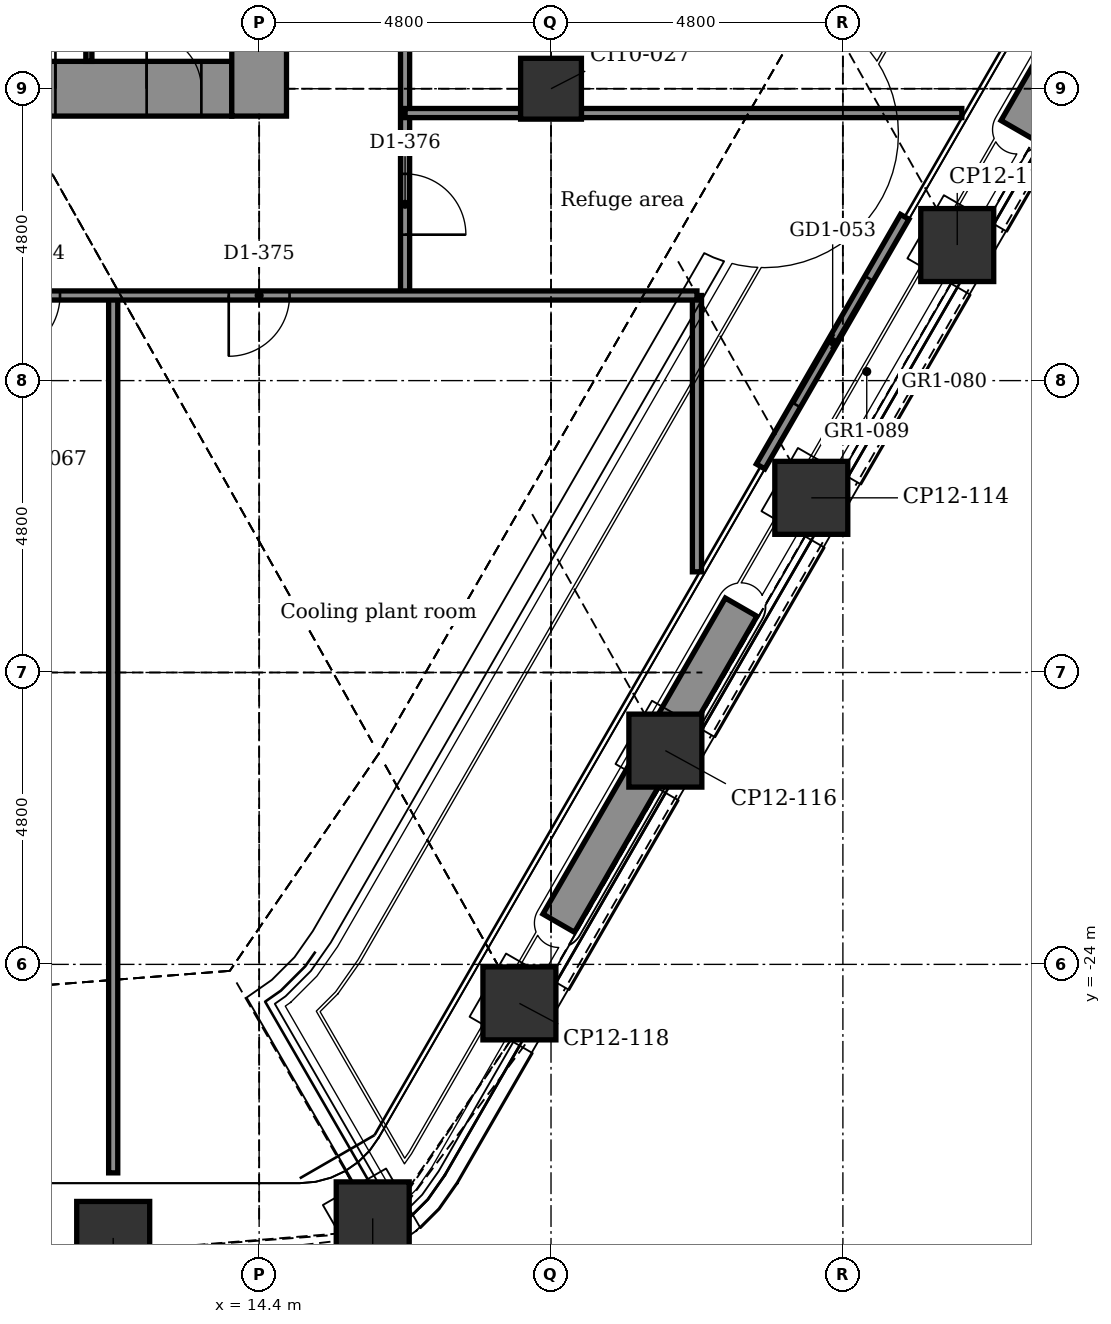
"""IFC4 building model, lengths in metres.
Left out: names, types, materials, properties, quantities, classifications, styles, units other than length and angle.
Written with IfcOpenShell. Run it as: python <this file> out.ifc"""

import sys

from ifc_helpers import new_model, si_unit, direction, frame, frame_2d, origin, origin_2d, place, context, subcontext, project, spatial, rectangle, extrude, element, fill, save


model = new_model("IFC4")
c1 = context("Model", 3, precision=1e-05, world=origin(), true_north=direction((0.0, 1.0)))
c2 = subcontext(c1, "Body", "Model", "MODEL_VIEW")
j1 = project(units=[si_unit("LENGTHUNIT", "METRE"), si_unit("PLANEANGLEUNIT", "RADIAN")], contexts=[c1])
p1 = place(None, origin())
s1 = spatial("IfcSite", under=j1, at=p1, CompositionType="ELEMENT")
p2 = place(p1, origin())
s2 = spatial("IfcBuilding", under=s1, at=p2, CompositionType="ELEMENT")
p3 = place(p2, frame((0.0, 0.0, 127.4)))
s3 = spatial("IfcBuildingStorey", under=s2, at=p3, CompositionType="ELEMENT", Elevation=127.4)
for number, where, z_axis, x_axis in (
    (1, (25.88, -12.171, -0.3), (0.0, 0.0, 1.0), (0.5, 0.866, 0.0)),
    (2, (23.48, -16.328, -0.3), (0.0, 0.0, 1.0), (0.5, 0.866, 0.0)),
    (3, (21.08, -20.485, -0.3), (0.0, 0.0, 1.0), (0.5, 0.866, 0.0)),
    (4, (18.68, -24.642, -0.3), (0.0, 0.0, 1.0), (0.5, 0.866, 0.0)),
    (5, (16.268, -28.177, -0.3), (0.0, 0.0, 1.0), (0.866, 0.5, 0.0)),
    (6, (12.0, -28.499, -0.3), (0.0, 0.0, 1.0), (1.0, 0.0, 0.0)),
):
    element("IfcColumn", number, at=place(p3, frame(where, z_axis=z_axis, x_axis=x_axis)), inside=s3, PredefinedType="COLUMN", context=c2, shape_type="SweptSolid", body=[
        extrude(rectangle(XDim=1.2, YDim=1.2, at=origin_2d()), origin(), (0.0, 0.0, 1.0), 6.15),
    ])
p4 = place(p3, frame((19.2, -9.6, -0.3), z_axis=(0.0, 0.0, 1.0), x_axis=(1.0, 0.0, 0.0)))
e7 = element("IfcColumn", 7, at=p4, inside=s3, PredefinedType="COLUMN", context=c2, shape_type="SweptSolid", body=[
    extrude(rectangle(XDim=1.0, YDim=1.0, at=origin_2d()), origin(), (0.0, 0.0, 1.0), 6.15),
])
p5 = place(p3, frame((10.05, -9.6, -0.3), z_axis=(0.0, 0.0, 1.0), x_axis=(1.0, 0.0, 0.0)))
e8 = element("IfcWall", 8, at=p5, inside=s3, PredefinedType="SHEAR", context=c2, shape_type="SweptSolid", body=[
    extrude(rectangle(XDim=3.9, YDim=0.9, at=frame_2d((1.95, 0.0))), origin(), (0.0, 0.0, 1.0), 6.15),
])
p6 = place(p5, frame((0.1, 0.0, 0.3)))
e9 = element("IfcOpeningElement", 9, at=p6, cuts=e8, PredefinedType="OPENING", context=c2, shape_type="SweptSolid", body=[
    extrude(rectangle(XDim=0.9, YDim=2.1, at=frame_2d((0.45, 1.05))), frame((0.0, 0.46, 0.0), z_axis=(0.0, -1.0, 0.0), x_axis=(1.0, 0.0, 0.0)), (0.0, 0.0, 1.0), 0.92),
])
p7 = place(p5, frame((2.5, 0.0, 0.3)))
e10 = element("IfcOpeningElement", 10, at=p7, cuts=e8, PredefinedType="OPENING", context=c2, shape_type="SweptSolid", body=[
    extrude(rectangle(XDim=0.9, YDim=2.1, at=frame_2d((0.45, 1.05))), frame((0.0, 0.46, 0.0), z_axis=(0.0, -1.0, 0.0), x_axis=(1.0, 0.0, 0.0)), (0.0, 0.0, 1.0), 0.92),
])
p8 = place(p3, frame((14.4, -10.05, -0.3), z_axis=(0.0, 0.0, 1.0), x_axis=(0.0, 1.0, 0.0)))
e11 = element("IfcWall", 11, at=p8, inside=s3, PredefinedType="SHEAR", context=c2, shape_type="SweptSolid", body=[
    extrude(rectangle(XDim=20.1, YDim=0.9, at=frame_2d((10.05, 0.0))), origin(), (0.0, 0.0, 1.0), 6.15),
])
p9 = place(p8, frame((3.5, 0.0, 0.3)))
e12 = element("IfcOpeningElement", 12, at=p9, cuts=e11, PredefinedType="OPENING", context=c2, shape_type="SweptSolid", body=[
    extrude(rectangle(XDim=1.1, YDim=2.1, at=frame_2d((0.55, 1.05))), frame((0.0, 0.46, 0.0), z_axis=(0.0, -1.0, 0.0), x_axis=(1.0, 0.0, 0.0)), (0.0, 0.0, 1.0), 0.92),
])
p10 = place(p8, frame((5.9, 0.0, 0.3)))
e13 = element("IfcOpeningElement", 13, at=p10, cuts=e11, PredefinedType="OPENING", context=c2, shape_type="SweptSolid", body=[
    extrude(rectangle(XDim=1.1, YDim=2.1, at=frame_2d((0.55, 1.05))), frame((0.0, 0.46, 0.0), z_axis=(0.0, -1.0, 0.0), x_axis=(1.0, 0.0, 0.0)), (0.0, 0.0, 1.0), 0.92),
])
p11 = place(p8, frame((8.3, 0.0, 0.3)))
e14 = element("IfcOpeningElement", 14, at=p11, cuts=e11, PredefinedType="OPENING", context=c2, shape_type="SweptSolid", body=[
    extrude(rectangle(XDim=1.1, YDim=2.1, at=frame_2d((0.55, 1.05))), frame((0.0, 0.46, 0.0), z_axis=(0.0, -1.0, 0.0), x_axis=(1.0, 0.0, 0.0)), (0.0, 0.0, 1.0), 0.92),
])
p12 = place(p8, frame((10.7, 0.0, 0.3)))
e15 = element("IfcOpeningElement", 15, at=p12, cuts=e11, PredefinedType="OPENING", context=c2, shape_type="SweptSolid", body=[
    extrude(rectangle(XDim=1.1, YDim=2.1, at=frame_2d((0.55, 1.05))), frame((0.0, 0.46, 0.0), z_axis=(0.0, -1.0, 0.0), x_axis=(1.0, 0.0, 0.0)), (0.0, 0.0, 1.0), 0.92),
])
p13 = place(p3, frame((25.017, -11.707, 0.0), z_axis=(0.0, 0.0, 1.0), x_axis=(-0.499978080042, -0.866038058908, 0.0)))
e16 = element("IfcWall", 16, at=p13, inside=s3, PredefinedType="PARTITIONING", context=c2, shape_type="SweptSolid", body=[
    extrude(rectangle(XDim=4.74, YDim=0.16, at=frame_2d((2.37, 0.0))), origin(), (0.0, 0.0, 1.0), 5.7),
])
p14 = place(p13, frame((1.17, 0.0, 0.0)))
e17 = element("IfcOpeningElement", 17, at=p14, cuts=e16, PredefinedType="OPENING", context=c2, shape_type="SweptSolid", body=[
    extrude(rectangle(XDim=2.4, YDim=2.4, at=frame_2d((1.2, 1.2))), frame((0.0, 0.09, 0.0), z_axis=(0.0, -1.0, 0.0), x_axis=(1.0, 0.0, 0.0)), (0.0, 0.0, 1.0), 0.18),
])
for number, where, z_axis, x_axis in (
    (18, (29.861, -5.076, 6.0), (0.0, 0.0, 1.0), (-0.5, -0.866, 0.0)),
    (19, (22.327, -18.126, 6.0), (0.0, 0.0, 1.0), (-0.5, -0.866, 0.0)),
):
    element("IfcWall", number, at=place(p3, frame(where, z_axis=z_axis, x_axis=x_axis)), inside=s3, PredefinedType="USERDEFINED", context=c2, shape_type="SweptSolid", body=[
        extrude(rectangle(XDim=6.0, YDim=0.6, at=frame_2d((3.0, 0.0))), origin(), (0.0, 0.0, 1.0), 0.7),
    ])
p15 = place(p3, frame((21.6, -17.545, 0.0), z_axis=(0.0, 0.0, 1.0), x_axis=(0.0, 1.0, 0.0)))
e20 = element("IfcWall", 20, at=p15, inside=s3, PredefinedType="PARTITIONING", context=c2, shape_type="SweptSolid", body=[
    extrude(rectangle(XDim=4.545, YDim=0.15, at=frame_2d((2.272, 0.0))), origin(), (0.0, 0.0, 1.0), 5.7),
])
p16 = place(p3, frame((16.8, -13.0, 0.0), z_axis=(0.0, 0.0, 1.0), x_axis=(0.0, 1.0, 0.0)))
e21 = element("IfcWall", 21, at=p16, inside=s3, PredefinedType="PARTITIONING", context=c2, shape_type="SweptSolid", body=[
    extrude(rectangle(XDim=9.05, YDim=0.15, at=frame_2d((4.525, 0.0))), origin(), (0.0, 0.0, 1.0), 5.85),
])
p17 = place(p16, frame((1.0, 0.0, 0.0)))
e22 = element("IfcOpeningElement", 22, at=p17, cuts=e21, PredefinedType="OPENING", context=c2, shape_type="SweptSolid", body=[
    extrude(rectangle(XDim=1.0, YDim=2.1, at=frame_2d((0.5, 1.05))), frame((0.0, 0.085, 0.0), z_axis=(0.0, -1.0, 0.0), x_axis=(1.0, 0.0, 0.0)), (0.0, 0.0, 1.0), 0.17),
])
p18 = place(p16, frame((5.8, 0.0, 0.0)))
e23 = element("IfcOpeningElement", 23, at=p18, cuts=e21, PredefinedType="OPENING", context=c2, shape_type="SweptSolid", body=[
    extrude(rectangle(XDim=1.0, YDim=2.1, at=frame_2d((0.5, 1.05))), frame((0.0, 0.085, 0.0), z_axis=(0.0, -1.0, 0.0), x_axis=(1.0, 0.0, 0.0)), (0.0, 0.0, 1.0), 0.17),
])
p19 = place(p3, frame((12.0, -27.428, 0.0), z_axis=(0.0, 0.0, 1.0), x_axis=(0.0, 1.0, 0.0)))
e24 = element("IfcWall", 24, at=p19, inside=s3, PredefinedType="PARTITIONING", context=c2, shape_type="SweptSolid", body=[
    extrude(rectangle(XDim=14.428, YDim=0.15, at=frame_2d((7.214, 0.0))), origin(), (0.0, 0.0, 1.0), 5.85),
])
p20 = place(p3, frame((11.6, -9.15, 0.0), z_axis=(0.0, 0.0, 1.0), x_axis=(0.0, 1.0, 0.0)))
e25 = element("IfcWall", 25, at=p20, inside=s3, PredefinedType="PARTITIONING", context=c2, shape_type="SweptSolid", body=[
    extrude(rectangle(XDim=1.8, YDim=0.1, at=frame_2d((0.9, 0.0))), origin(), (0.0, 0.0, 1.0), 5.85),
])
p21 = place(p3, frame((-21.6, -13.0, 0.0), z_axis=(0.0, 0.0, 1.0), x_axis=(1.0, 0.0, 0.0)))
e26 = element("IfcWall", 26, at=p21, inside=s3, PredefinedType="PARTITIONING", context=c2, shape_type="SweptSolid", body=[
    extrude(rectangle(XDim=43.2, YDim=0.15, at=frame_2d((21.6, 0.0))), origin(), (0.0, 0.0, 1.0), 5.7),
])
p22 = place(p21, frame((5.5, 0.0, 0.0)))
e27 = element("IfcOpeningElement", 27, at=p22, cuts=e26, PredefinedType="OPENING", context=c2, shape_type="SweptSolid", body=[
    extrude(rectangle(XDim=1.0, YDim=2.1, at=frame_2d((0.5, 1.05))), frame((0.0, 0.085, 0.0), z_axis=(0.0, -1.0, 0.0), x_axis=(1.0, 0.0, 0.0)), (0.0, 0.0, 1.0), 0.17),
])
p23 = place(p21, frame((10.425, 0.0, 0.0)))
e28 = element("IfcOpeningElement", 28, at=p23, cuts=e26, PredefinedType="OPENING", context=c2, shape_type="SweptSolid", body=[
    extrude(rectangle(XDim=1.0, YDim=2.1, at=frame_2d((0.5, 1.05))), frame((0.0, 0.085, 0.0), z_axis=(0.0, -1.0, 0.0), x_axis=(1.0, 0.0, 0.0)), (0.0, 0.0, 1.0), 0.17),
])
p24 = place(p21, frame((16.955, 0.0, 0.0)))
e29 = element("IfcOpeningElement", 29, at=p24, cuts=e26, PredefinedType="OPENING", context=c2, shape_type="SweptSolid", body=[
    extrude(rectangle(XDim=1.0, YDim=2.1, at=frame_2d((0.5, 1.05))), frame((0.0, 0.085, 0.0), z_axis=(0.0, -1.0, 0.0), x_axis=(1.0, 0.0, 0.0)), (0.0, 0.0, 1.0), 0.17),
])
p25 = place(p21, frame((19.9, 0.0, 0.0)))
e30 = element("IfcOpeningElement", 30, at=p25, cuts=e26, PredefinedType="OPENING", context=c2, shape_type="SweptSolid", body=[
    extrude(rectangle(XDim=1.0, YDim=2.1, at=frame_2d((0.5, 1.05))), frame((0.0, 0.085, 0.0), z_axis=(0.0, -1.0, 0.0), x_axis=(1.0, 0.0, 0.0)), (0.0, 0.0, 1.0), 0.17),
])
p26 = place(p21, frame((22.3, 0.0, 0.0)))
e31 = element("IfcOpeningElement", 31, at=p26, cuts=e26, PredefinedType="OPENING", context=c2, shape_type="SweptSolid", body=[
    extrude(rectangle(XDim=1.0, YDim=2.1, at=frame_2d((0.5, 1.05))), frame((0.0, 0.085, 0.0), z_axis=(0.0, -1.0, 0.0), x_axis=(1.0, 0.0, 0.0)), (0.0, 0.0, 1.0), 0.17),
])
p27 = place(p21, frame((24.7, 0.0, 0.0)))
e32 = element("IfcOpeningElement", 32, at=p27, cuts=e26, PredefinedType="OPENING", context=c2, shape_type="SweptSolid", body=[
    extrude(rectangle(XDim=1.0, YDim=2.1, at=frame_2d((0.5, 1.05))), frame((0.0, 0.085, 0.0), z_axis=(0.0, -1.0, 0.0), x_axis=(1.0, 0.0, 0.0)), (0.0, 0.0, 1.0), 0.17),
])
p28 = place(p21, frame((28.3, 0.0, 0.0)))
e33 = element("IfcOpeningElement", 33, at=p28, cuts=e26, PredefinedType="OPENING", context=c2, shape_type="SweptSolid", body=[
    extrude(rectangle(XDim=1.0, YDim=2.1, at=frame_2d((0.5, 1.05))), frame((0.0, 0.085, 0.0), z_axis=(0.0, -1.0, 0.0), x_axis=(1.0, 0.0, 0.0)), (0.0, 0.0, 1.0), 0.17),
])
p29 = place(p21, frame((31.725, 0.0, 0.0)))
e34 = element("IfcOpeningElement", 34, at=p29, cuts=e26, PredefinedType="OPENING", context=c2, shape_type="SweptSolid", body=[
    extrude(rectangle(XDim=1.0, YDim=2.1, at=frame_2d((0.5, 1.05))), frame((0.0, 0.085, 0.0), z_axis=(0.0, -1.0, 0.0), x_axis=(1.0, 0.0, 0.0)), (0.0, 0.0, 1.0), 0.17),
])
p30 = place(p21, frame((35.5, 0.0, 0.0)))
e35 = element("IfcOpeningElement", 35, at=p30, cuts=e26, PredefinedType="OPENING", context=c2, shape_type="SweptSolid", body=[
    extrude(rectangle(XDim=1.0, YDim=2.1, at=frame_2d((0.5, 1.05))), frame((0.0, 0.085, 0.0), z_axis=(0.0, -1.0, 0.0), x_axis=(1.0, 0.0, 0.0)), (0.0, 0.0, 1.0), 0.17),
])
p31 = place(p3, frame((16.8, -10.0, 0.0), z_axis=(0.0, 0.0, 1.0), x_axis=(1.0, 0.0, 0.0)))
e36 = element("IfcWall", 36, at=p31, inside=s3, PredefinedType="PARTITIONING", context=c2, shape_type="SweptSolid", body=[
    extrude(rectangle(XDim=1.9, YDim=0.15, at=frame_2d((0.95, 0.0))), origin(), (0.0, 0.0, 1.0), 5.85),
])
p32 = place(p3, frame((19.7, -10.0, 0.0), z_axis=(0.0, 0.0, 1.0), x_axis=(1.0, 0.0, 0.0)))
e37 = element("IfcWall", 37, at=p32, inside=s3, PredefinedType="PARTITIONING", context=c2, shape_type="SweptSolid", body=[
    extrude(rectangle(XDim=6.256, YDim=0.15, at=frame_2d((3.128, 0.0))), origin(), (0.0, 0.0, 1.0), 5.7),
])
p33 = place(p14, origin())
e38 = element("IfcDoor", 38, at=p33, inside=s3, OperationType="DOUBLE_DOOR_SLIDING", PredefinedType="DOOR", context=c2, shape_type="SweptSolid", body=[
    extrude(rectangle(XDim=2.4, YDim=2.4, at=frame_2d((1.2, 1.2))), frame((0.0, 0.025, 0.0), z_axis=(0.0, -1.0, 0.0), x_axis=(1.0, 0.0, 0.0)), (0.0, 0.0, 1.0), 0.05),
])
fill(e17, e38)
p34 = place(p29, frame((1.0, 0.0, 0.0), z_axis=(0.0, 0.0, 1.0), x_axis=(-1.0, 0.0, 0.0)))
e39 = element("IfcDoor", 39, at=p34, inside=s3, OperationType="SINGLE_SWING_LEFT", PredefinedType="DOOR", context=c2, shape_type="SweptSolid", body=[
    extrude(rectangle(XDim=1.0, YDim=2.1, at=frame_2d((0.5, 1.05))), frame((0.0, 0.025, 0.0), z_axis=(0.0, -1.0, 0.0), x_axis=(1.0, 0.0, 0.0)), (0.0, 0.0, 1.0), 0.05),
])
fill(e34, e39)
p35 = place(p30, frame((1.0, 0.0, 0.0), z_axis=(0.0, 0.0, 1.0), x_axis=(-1.0, 0.0, 0.0)))
e40 = element("IfcDoor", 40, at=p35, inside=s3, OperationType="SINGLE_SWING_LEFT", PredefinedType="DOOR", context=c2, shape_type="SweptSolid", body=[
    extrude(rectangle(XDim=1.0, YDim=2.1, at=frame_2d((0.5, 1.05))), frame((0.0, 0.025, 0.0), z_axis=(0.0, -1.0, 0.0), x_axis=(1.0, 0.0, 0.0)), (0.0, 0.0, 1.0), 0.05),
])
fill(e35, e40)
p36 = place(p17, frame((1.0, 0.0, 0.0), z_axis=(0.0, 0.0, 1.0), x_axis=(-1.0, 0.0, 0.0)))
e41 = element("IfcDoor", 41, at=p36, inside=s3, OperationType="SINGLE_SWING_LEFT", PredefinedType="DOOR", context=c2, shape_type="SweptSolid", body=[
    extrude(rectangle(XDim=1.0, YDim=2.1, at=frame_2d((0.5, 1.05))), frame((0.0, 0.025, 0.0), z_axis=(0.0, -1.0, 0.0), x_axis=(1.0, 0.0, 0.0)), (0.0, 0.0, 1.0), 0.05),
])
fill(e22, e41)
p37 = place(p6, origin())
e42 = element("IfcDoor", 42, at=p37, inside=s3, OperationType="SINGLE_SWING_RIGHT", PredefinedType="DOOR", context=c2, shape_type="SweptSolid", body=[
    extrude(rectangle(XDim=0.9, YDim=2.1, at=frame_2d((0.45, 1.05))), frame((0.0, 0.025, 0.0), z_axis=(0.0, -1.0, 0.0), x_axis=(1.0, 0.0, 0.0)), (0.0, 0.0, 1.0), 0.05),
])
fill(e9, e42)
p38 = place(p7, origin())
e43 = element("IfcDoor", 43, at=p38, inside=s3, OperationType="SINGLE_SWING_LEFT", PredefinedType="DOOR", context=c2, shape_type="SweptSolid", body=[
    extrude(rectangle(XDim=0.9, YDim=2.1, at=frame_2d((0.45, 1.05))), frame((0.0, 0.025, 0.0), z_axis=(0.0, -1.0, 0.0), x_axis=(1.0, 0.0, 0.0)), (0.0, 0.0, 1.0), 0.05),
])
fill(e10, e43)
save(model, sys.argv[1])
